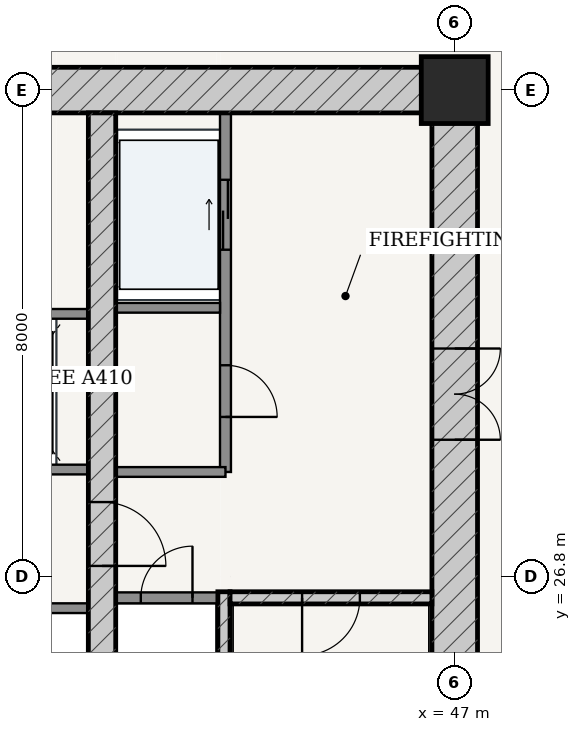
"""IFC4 building model, lengths in metres.
Left out: names, types, materials, properties, quantities, classifications, styles, units other than length and angle.
Written with IfcOpenShell. Run it as: python <this file> out.ifc"""

import sys

from ifc_helpers import new_model, si_unit, direction, frame, frame_2d, origin, origin_2d, place, context, subcontext, project, spatial, rectangle, extrude, source, transform, mapped, element, fill, save


model = new_model("IFC4")
c1 = context("Model", 3, precision=1e-05, world=origin(), true_north=direction((-0.2419218956, 0.970295726276)))
c2 = subcontext(c1, "Body", "Model", "MODEL_VIEW")
j1 = project(units=[si_unit("LENGTHUNIT", "METRE"), si_unit("PLANEANGLEUNIT", "RADIAN")], contexts=[c1])
p1 = place(None, origin())
s1 = spatial("IfcSite", under=j1, at=p1, CompositionType="ELEMENT")
p2 = place(p1, origin())
s2 = spatial("IfcBuilding", under=s1, at=p2, CompositionType="ELEMENT")
p3 = place(p2, frame((0.0, 0.0, 34.8)))
s3 = spatial("IfcBuildingStorey", under=s2, at=p3, CompositionType="ELEMENT", Elevation=34.8)
p4 = place(p3, frame((47.0, 34.8, 0.0), z_axis=(0.0, 0.0, 1.0), x_axis=(1.0, 0.0, 0.0)))
e1 = element("IfcColumn", 1, at=p4, inside=s3, PredefinedType="COLUMN", context=c2, shape_type="SweptSolid", body=[
    extrude(rectangle(XDim=1.1, YDim=1.1, at=origin_2d()), origin(), (0.0, 0.0, 1.0), 3.6),
])
p5 = place(p3, frame((28.625, 34.8, 0.0), z_axis=(0.0, 0.0, 1.0), x_axis=(1.0, 0.0, 0.0)))
e2 = element("IfcWall", 2, at=p5, inside=s3, PredefinedType="SHEAR", context=c2, shape_type="SweptSolid", body=[
    extrude(rectangle(XDim=18.75, YDim=0.75, at=frame_2d((9.375, 0.0))), origin(), (0.0, 0.0, 1.0), 3.32),
])
p6 = place(p5, frame((7.407, 0.0, 0.0)))
e3 = element("IfcOpeningElement", 3, at=p6, cuts=e2, PredefinedType="OPENING", context=c2, shape_type="SweptSolid", body=[
    extrude(rectangle(XDim=0.86, YDim=2.1, at=frame_2d((0.43, 1.05))), frame((0.0, 0.385, 0.0), z_axis=(0.0, -1.0, 0.0), x_axis=(1.0, 0.0, 0.0)), (0.0, 0.0, 1.0), 0.77),
])
p7 = place(p5, frame((10.488, 0.0, 0.0)))
e4 = element("IfcOpeningElement", 4, at=p7, cuts=e2, PredefinedType="OPENING", context=c2, shape_type="SweptSolid", body=[
    extrude(rectangle(XDim=0.85, YDim=2.1, at=frame_2d((0.425, 1.05))), frame((0.0, 0.385, 0.0), z_axis=(0.0, -1.0, 0.0), x_axis=(1.0, 0.0, 0.0)), (0.0, 0.0, 1.0), 0.77),
])
p8 = place(p3, frame((47.0, 19.175, 0.0), z_axis=(0.0, 0.0, 1.0), x_axis=(0.0, 1.0, 0.0)))
e5 = element("IfcWall", 5, at=p8, inside=s3, PredefinedType="SHEAR", context=c2, shape_type="SweptSolid", body=[
    extrude(rectangle(XDim=15.25, YDim=0.75, at=frame_2d((7.625, 0.0))), origin(), (0.0, 0.0, 1.0), 3.32),
])
p9 = place(p8, frame((9.875, 0.0, 0.0)))
e6 = element("IfcOpeningElement", 6, at=p9, cuts=e5, PredefinedType="OPENING", context=c2, shape_type="SweptSolid", body=[
    extrude(rectangle(XDim=1.5, YDim=2.2, at=frame_2d((0.75, 1.1))), frame((0.0, 0.385, 0.0), z_axis=(0.0, -1.0, 0.0), x_axis=(1.0, 0.0, 0.0)), (0.0, 0.0, 1.0), 0.77),
])
p10 = place(p3, frame((43.205, 19.175, 0.0), z_axis=(0.0, 0.0, 1.0), x_axis=(0.0, 1.0, 0.0)))
e7 = element("IfcWall", 7, at=p10, inside=s3, PredefinedType="SOLIDWALL", context=c2, shape_type="SweptSolid", body=[
    extrude(rectangle(XDim=7.375, YDim=0.2, at=frame_2d((3.688, 0.0))), origin(), (0.0, 0.0, 1.0), 3.32),
])
p11 = place(p3, frame((43.305, 26.45, 0.0), z_axis=(0.0, 0.0, 1.0), x_axis=(1.0, 0.0, 0.0)))
e8 = element("IfcWall", 8, at=p11, inside=s3, PredefinedType="SOLIDWALL", context=c2, shape_type="SweptSolid", body=[
    extrude(rectangle(XDim=3.32, YDim=0.2, at=frame_2d((1.66, 0.0))), origin(), (0.0, 0.0, 1.0), 3.32),
])
p12 = place(p11, frame((1.185, 0.0, 0.0)))
e9 = element("IfcOpeningElement", 9, at=p12, cuts=e8, PredefinedType="OPENING", context=c2, shape_type="SweptSolid", body=[
    extrude(rectangle(XDim=0.95, YDim=2.15, at=frame_2d((0.475, 1.075))), frame((0.0, 0.11, 0.0), z_axis=(0.0, -1.0, 0.0), x_axis=(1.0, 0.0, 0.0)), (0.0, 0.0, 1.0), 0.22),
])
p13 = place(p3, frame((41.2, 19.175, 0.0), z_axis=(0.0, 0.0, 1.0), x_axis=(0.0, 1.0, 0.0)))
e10 = element("IfcWall", 10, at=p13, inside=s3, PredefinedType="SHEAR", context=c2, shape_type="SweptSolid", body=[
    extrude(rectangle(XDim=15.25, YDim=0.45, at=frame_2d((7.625, 0.0))), origin(), (0.0, 0.0, 1.0), 3.32),
])
p14 = place(p13, frame((7.8, 0.0, 0.0)))
e11 = element("IfcOpeningElement", 11, at=p14, cuts=e10, PredefinedType="OPENING", context=c2, shape_type="SweptSolid", body=[
    extrude(rectangle(XDim=1.05, YDim=2.15, at=frame_2d((0.525, 1.075))), frame((0.0, 0.235, 0.0), z_axis=(0.0, -1.0, 0.0), x_axis=(1.0, 0.0, 0.0)), (0.0, 0.0, 1.0), 0.47),
])
p15 = place(p3, frame((41.425, 26.45, 0.0), z_axis=(0.0, 0.0, 1.0), x_axis=(1.0, 0.0, 0.0)))
e12 = element("IfcWall", 12, at=p15, inside=s3, PredefinedType="PARTITIONING", context=c2, shape_type="SweptSolid", body=[
    extrude(rectangle(XDim=1.675, YDim=0.18, at=frame_2d((0.837, 0.0))), origin(), (0.0, 0.0, 1.0), 3.32),
])
p16 = place(p15, frame((0.413, 0.0, 0.0)))
e13 = element("IfcOpeningElement", 13, at=p16, cuts=e12, PredefinedType="OPENING", context=c2, shape_type="SweptSolid", body=[
    extrude(rectangle(XDim=0.85, YDim=2.1, at=frame_2d((0.425, 1.05))), frame((0.0, 0.1, 0.0), z_axis=(0.0, -1.0, 0.0), x_axis=(1.0, 0.0, 0.0)), (0.0, 0.0, 1.0), 0.2),
])
p17 = place(p3, frame((43.23, 28.52, 0.0), z_axis=(0.0, 0.0, 1.0), x_axis=(0.0, 1.0, 0.0)))
e14 = element("IfcWall", 14, at=p17, inside=s3, PredefinedType="PARTITIONING", context=c2, shape_type="SweptSolid", body=[
    extrude(rectangle(XDim=5.905, YDim=0.18, at=frame_2d((2.953, 0.0))), origin(), (0.0, 0.0, 1.0), 3.32),
])
p18 = place(p17, frame((0.905, 0.0, 0.0)))
e15 = element("IfcOpeningElement", 15, at=p18, cuts=e14, PredefinedType="OPENING", context=c2, shape_type="SweptSolid", body=[
    extrude(rectangle(XDim=0.85, YDim=2.1, at=frame_2d((0.425, 1.05))), frame((0.0, 0.1, 0.0), z_axis=(0.0, -1.0, 0.0), x_axis=(1.0, 0.0, 0.0)), (0.0, 0.0, 1.0), 0.2),
])
p19 = place(p17, frame((3.655, 0.0, 0.0)))
e16 = element("IfcOpeningElement", 16, at=p19, cuts=e14, PredefinedType="OPENING", context=c2, shape_type="SweptSolid", body=[
    extrude(rectangle(XDim=1.15, YDim=2.2, at=frame_2d((0.575, 1.1))), frame((0.0, 0.1, 0.0), z_axis=(0.0, -1.0, 0.0), x_axis=(1.0, 0.0, 0.0)), (0.0, 0.0, 1.0), 0.2),
])
p20 = place(p3, frame((41.425, 31.22, 0.0), z_axis=(0.0, 0.0, 1.0), x_axis=(1.0, 0.0, 0.0)))
e17 = element("IfcWall", 17, at=p20, inside=s3, PredefinedType="PARTITIONING", context=c2, shape_type="SweptSolid", body=[
    extrude(rectangle(XDim=1.715, YDim=0.16, at=frame_2d((0.857, 0.0))), origin(), (0.0, 0.0, 1.0), 3.32),
])
p21 = place(p3, frame((41.425, 28.52, 0.0), z_axis=(0.0, 0.0, 1.0), x_axis=(1.0, 0.0, 0.0)))
e18 = element("IfcWall", 18, at=p21, inside=s3, PredefinedType="PARTITIONING", context=c2, shape_type="SweptSolid", body=[
    extrude(rectangle(XDim=1.805, YDim=0.16, at=frame_2d((0.902, 0.0))), origin(), (0.0, 0.0, 1.0), 3.32),
])
p22 = place(p3, frame((35.025, 28.56, 0.0), z_axis=(0.0, 0.0, 1.0), x_axis=(1.0, 0.0, 0.0)))
e19 = element("IfcWall", 19, at=p22, inside=s3, PredefinedType="PARTITIONING", context=c2, shape_type="SweptSolid", body=[
    extrude(rectangle(XDim=5.95, YDim=0.16, at=frame_2d((2.975, 0.0))), origin(), (0.0, 0.0, 1.0), 3.32),
])
p23 = place(p22, frame((0.76, 0.0, 0.0)))
e20 = element("IfcOpeningElement", 20, at=p23, cuts=e19, PredefinedType="OPENING", context=c2, shape_type="SweptSolid", body=[
    extrude(rectangle(XDim=1.1, YDim=2.2, at=frame_2d((0.55, 1.1))), frame((0.0, 0.09, 0.0), z_axis=(0.0, -1.0, 0.0), x_axis=(1.0, 0.0, 0.0)), (0.0, 0.0, 1.0), 0.18),
])
p24 = place(p22, frame((2.425, 0.0, 0.0)))
e21 = element("IfcOpeningElement", 21, at=p24, cuts=e19, PredefinedType="OPENING", context=c2, shape_type="SweptSolid", body=[
    extrude(rectangle(XDim=1.1, YDim=2.2, at=frame_2d((0.55, 1.1))), frame((0.0, 0.09, 0.0), z_axis=(0.0, -1.0, 0.0), x_axis=(1.0, 0.0, 0.0)), (0.0, 0.0, 1.0), 0.18),
])
p25 = place(p22, frame((4.09, 0.0, 0.0)))
e22 = element("IfcOpeningElement", 22, at=p25, cuts=e19, PredefinedType="OPENING", context=c2, shape_type="SweptSolid", body=[
    extrude(rectangle(XDim=1.1, YDim=2.2, at=frame_2d((0.55, 1.1))), frame((0.0, 0.09, 0.0), z_axis=(0.0, -1.0, 0.0), x_axis=(1.0, 0.0, 0.0)), (0.0, 0.0, 1.0), 0.18),
])
for number, where, z_axis, x_axis in (
    (23, (35.025, 31.12, 0.0), (0.0, 0.0, 1.0), (1.0, 0.0, 0.0)),
    (24, (35.025, 26.28, 0.0), (0.0, 0.0, 1.0), (1.0, 0.0, 0.0)),
):
    element("IfcWall", number, at=place(p3, frame(where, z_axis=z_axis, x_axis=x_axis)), inside=s3, PredefinedType="PARTITIONING", context=c2, shape_type="SweptSolid", body=[
        extrude(rectangle(XDim=5.95, YDim=0.16, at=frame_2d((2.975, 0.0))), origin(), (0.0, 0.0, 1.0), 3.32),
    ])
m1 = source(origin(), c2, "Body", "SweptSolid", [
    extrude(rectangle(XDim=1.5, YDim=2.2, at=frame_2d((0.75, 1.1))), frame((0.0, 0.025, 0.0), z_axis=(0.0, -1.0, 0.0), x_axis=(1.0, 0.0, 0.0)), (0.0, 0.0, 1.0), 0.05),
])
p26 = place(p9, frame((1.5, 0.0, 0.0), z_axis=(0.0, 0.0, 1.0), x_axis=(-1.0, 0.0, 0.0)))
e25 = element("IfcDoor", 25, at=p26, inside=s3, OperationType="DOUBLE_DOOR_SINGLE_SWING", PredefinedType="DOOR", context=c2, shape_type="MappedRepresentation", body=[
    mapped(m1, transform((0.0, 0.0, 0.0), scale=1.0)),
])
fill(e6, e25)
m2 = source(origin(), c2, "Body", "SweptSolid", [
    extrude(rectangle(XDim=1.05, YDim=2.15, at=frame_2d((0.525, 1.075))), frame((0.0, 0.025, 0.0), z_axis=(0.0, -1.0, 0.0), x_axis=(1.0, 0.0, 0.0)), (0.0, 0.0, 1.0), 0.05),
])
p27 = place(p14, frame((1.05, 0.0, 0.0), z_axis=(0.0, 0.0, 1.0), x_axis=(-1.0, 0.0, 0.0)))
e26 = element("IfcDoor", 26, at=p27, inside=s3, OperationType="SINGLE_SWING_RIGHT", PredefinedType="DOOR", context=c2, shape_type="MappedRepresentation", body=[
    mapped(m2, transform((0.0, 0.0, 0.0), scale=1.0)),
])
fill(e11, e26)
m3 = source(origin(), c2, "Body", "SweptSolid", [
    extrude(rectangle(XDim=0.95, YDim=2.15, at=frame_2d((0.475, 1.075))), frame((0.0, 0.025, 0.0), z_axis=(0.0, -1.0, 0.0), x_axis=(1.0, 0.0, 0.0)), (0.0, 0.0, 1.0), 0.05),
])
p28 = place(p12, frame((0.95, 0.0, 0.0), z_axis=(0.0, 0.0, 1.0), x_axis=(-1.0, 0.0, 0.0)))
e27 = element("IfcDoor", 27, at=p28, inside=s3, OperationType="SINGLE_SWING_RIGHT", PredefinedType="DOOR", context=c2, shape_type="MappedRepresentation", body=[
    mapped(m3, transform((0.0, 0.0, 0.0), scale=1.0)),
])
fill(e9, e27)
m4 = source(origin(), c2, "Body", "SweptSolid", [
    extrude(rectangle(XDim=0.85, YDim=2.1, at=frame_2d((0.425, 1.05))), frame((0.0, 0.025, 0.0), z_axis=(0.0, -1.0, 0.0), x_axis=(1.0, 0.0, 0.0)), (0.0, 0.0, 1.0), 0.05),
])
p29 = place(p16, origin())
e28 = element("IfcDoor", 28, at=p29, inside=s3, OperationType="SINGLE_SWING_RIGHT", PredefinedType="DOOR", context=c2, shape_type="MappedRepresentation", body=[
    mapped(m4, transform((0.0, 0.0, 0.0), scale=1.0)),
])
fill(e13, e28)
p30 = place(p18, frame((0.85, 0.0, 0.0), z_axis=(0.0, 0.0, 1.0), x_axis=(-1.0, 0.0, 0.0)))
e29 = element("IfcDoor", 29, at=p30, inside=s3, OperationType="SINGLE_SWING_RIGHT", PredefinedType="DOOR", context=c2, shape_type="MappedRepresentation", body=[
    mapped(m4, transform((0.0, 0.0, 0.0), scale=1.0)),
])
fill(e15, e29)
m5 = source(origin(), c2, "Body", "SweptSolid", [
    extrude(rectangle(XDim=1.15, YDim=2.2, at=frame_2d((0.575, 1.1))), frame((0.0, 0.025, 0.0), z_axis=(0.0, -1.0, 0.0), x_axis=(1.0, 0.0, 0.0)), (0.0, 0.0, 1.0), 0.05),
])
p31 = place(p19, origin())
e30 = element("IfcDoor", 30, at=p31, inside=s3, OperationType="DOUBLE_DOOR_SLIDING", PredefinedType="DOOR", context=c2, shape_type="MappedRepresentation", body=[
    mapped(m5, transform((0.0, 0.0, 0.0), scale=1.0)),
])
fill(e16, e30)
save(model, sys.argv[1])
